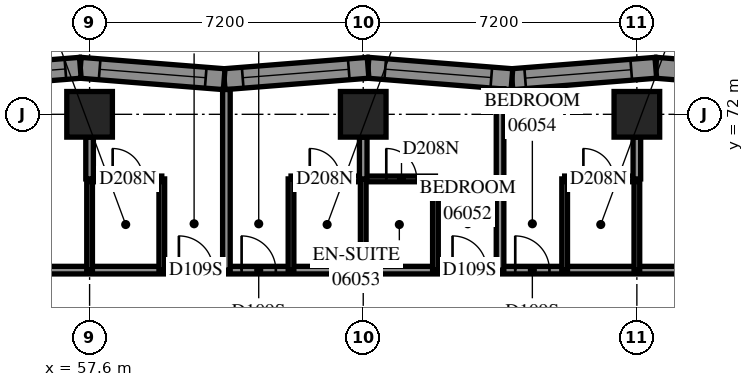
"""IFC4 building model, lengths in metres.
Left out: names, types, materials, properties, quantities, classifications, styles, units other than length and angle.
Written with IfcOpenShell. Run it as: python <this file> out.ifc"""

import sys

from ifc_helpers import new_model, si_unit, direction, frame, frame_2d, origin, origin_2d, place, context, subcontext, project, spatial, polyline, rectangle, outline, extrude, element, fill, save


model = new_model("IFC4")
c1 = context("Model", 3, precision=1e-05, world=origin(), true_north=direction((0.0, 1.0)))
c2 = subcontext(c1, "Body", "Model", "MODEL_VIEW")
j1 = project(units=[si_unit("LENGTHUNIT", "METRE"), si_unit("PLANEANGLEUNIT", "RADIAN")], contexts=[c1])
p1 = place(None, origin())
s1 = spatial("IfcSite", under=j1, at=p1, CompositionType="ELEMENT")
p2 = place(p1, origin())
s2 = spatial("IfcBuilding", under=s1, at=p2, CompositionType="ELEMENT")
p3 = place(p2, frame((0.0, 0.0, 27.0)))
s3 = spatial("IfcBuildingStorey", under=s2, at=p3, CompositionType="ELEMENT", Elevation=27.0)
for number, where, z_axis, x_axis in (
    (1, (57.6, 72.0, 0.0), (0.0, 0.0, 1.0), (1.0, 0.0, 0.0)),
    (2, (64.8, 72.0, 0.0), (0.0, 0.0, 1.0), (1.0, 0.0, 0.0)),
    (3, (72.0, 72.0, 0.0), (0.0, 0.0, 1.0), (1.0, 0.0, 0.0)),
):
    element("IfcColumn", number, at=place(p3, frame(where, z_axis=z_axis, x_axis=x_axis)), inside=s3, PredefinedType="COLUMN", context=c2, shape_type="SweptSolid", body=[
        extrude(rectangle(XDim=1.2, YDim=1.2, at=origin_2d()), origin(), (0.0, 0.0, 1.0), 3.1),
    ])
p4 = place(p3, frame((76.306, 72.922, 0.0), z_axis=(0.0, 0.0, 1.0), x_axis=(-0.9968745318, 0.0790010628, 0.0)))
e4 = element("IfcWall", 4, at=p4, inside=s3, PredefinedType="SOLIDWALL", context=c2, shape_type="SweptSolid", body=[
    extrude(outline(polyline([(0.043, -0.275), (3.841, -0.275), (3.797, 0.275), (-0.043, 0.275), (0.043, -0.275)])), origin(), (0.0, 0.0, 1.0), 3.1),
])
p5 = place(p4, frame((1.553, 0.0, 0.5)))
e5 = element("IfcOpeningElement", 5, at=p5, cuts=e4, PredefinedType="OPENING", context=c2, shape_type="SweptSolid", body=[
    extrude(rectangle(XDim=1.2, YDim=2.45, at=frame_2d((0.6, 1.225))), frame((0.0, 0.285, 0.0), z_axis=(0.0, -1.0, 0.0), x_axis=(1.0, 0.0, 0.0)), (0.0, 0.0, 1.0), 0.57),
])
p6 = place(p3, frame((72.499, 73.224, 0.0), z_axis=(0.0, 0.0, 1.0), x_axis=(-0.9968747806, -0.0789979222, 0.0)))
e6 = element("IfcWall", 6, at=p6, inside=s3, PredefinedType="SOLIDWALL", context=c2, shape_type="SweptSolid", body=[
    extrude(outline(polyline([(-0.022, -0.275), (3.776, -0.275), (3.819, 0.275), (0.022, 0.275), (-0.022, -0.275)])), origin(), (0.0, 0.0, 1.0), 3.1),
])
p7 = place(p6, frame((0.649, 0.0, 0.5)))
e7 = element("IfcOpeningElement", 7, at=p7, cuts=e6, PredefinedType="OPENING", context=c2, shape_type="SweptSolid", body=[
    extrude(rectangle(XDim=2.8, YDim=2.45, at=frame_2d((1.4, 1.225))), frame((0.0, 0.285, 0.0), z_axis=(0.0, -1.0, 0.0), x_axis=(1.0, 0.0, 0.0)), (0.0, 0.0, 1.0), 0.57),
])
p8 = place(p3, frame((68.713, 72.924, 0.0), z_axis=(0.0, 0.0, 1.0), x_axis=(-0.9968746163, 0.078999996, 0.0)))
e8 = element("IfcWall", 8, at=p8, inside=s3, PredefinedType="SOLIDWALL", context=c2, shape_type="SweptSolid", body=[
    extrude(outline(polyline([(0.022, -0.275), (3.819, -0.275), (3.776, 0.275), (-0.022, 0.275), (0.022, -0.275)])), origin(), (0.0, 0.0, 1.0), 3.1),
])
p9 = place(p8, frame((0.545, 0.0, 0.5)))
e9 = element("IfcOpeningElement", 9, at=p9, cuts=e8, PredefinedType="OPENING", context=c2, shape_type="SweptSolid", body=[
    extrude(rectangle(XDim=2.8, YDim=2.45, at=frame_2d((1.4, 1.225))), frame((0.0, 0.285, 0.0), z_axis=(0.0, -1.0, 0.0), x_axis=(1.0, 0.0, 0.0)), (0.0, 0.0, 1.0), 0.57),
])
p10 = place(p3, frame((64.927, 73.224, 0.0), z_axis=(0.0, 0.0, 1.0), x_axis=(-0.9968746163, -0.078999996, 0.0)))
e10 = element("IfcWall", 10, at=p10, inside=s3, PredefinedType="SOLIDWALL", context=c2, shape_type="SweptSolid", body=[
    extrude(outline(polyline([(-0.022, -0.275), (3.776, -0.275), (3.819, 0.275), (0.022, 0.275), (-0.022, -0.275)])), origin(), (0.0, 0.0, 1.0), 3.1),
])
p11 = place(p10, frame((0.51, 0.0, 0.5)))
e11 = element("IfcOpeningElement", 11, at=p11, cuts=e10, PredefinedType="OPENING", context=c2, shape_type="SweptSolid", body=[
    extrude(rectangle(XDim=2.8, YDim=2.45, at=frame_2d((1.4, 1.225))), frame((0.0, 0.285, 0.0), z_axis=(0.0, -1.0, 0.0), x_axis=(1.0, 0.0, 0.0)), (0.0, 0.0, 1.0), 0.57),
])
p12 = place(p3, frame((61.142, 72.924, 0.0), z_axis=(0.0, 0.0, 1.0), x_axis=(-0.9968746163, 0.078999996, 0.0)))
e12 = element("IfcWall", 12, at=p12, inside=s3, PredefinedType="SOLIDWALL", context=c2, shape_type="SweptSolid", body=[
    extrude(outline(polyline([(0.022, -0.275), (3.819, -0.275), (3.776, 0.275), (-0.022, 0.275), (0.022, -0.275)])), origin(), (0.0, 0.0, 1.0), 3.1),
])
p13 = place(p12, frame((0.488, 0.0, 0.5)))
e13 = element("IfcOpeningElement", 13, at=p13, cuts=e12, PredefinedType="OPENING", context=c2, shape_type="SweptSolid", body=[
    extrude(rectangle(XDim=2.8, YDim=2.45, at=frame_2d((1.4, 1.225))), frame((0.0, 0.285, 0.0), z_axis=(0.0, -1.0, 0.0), x_axis=(1.0, 0.0, 0.0)), (0.0, 0.0, 1.0), 0.57),
])
p14 = place(p3, frame((57.356, 73.224, 0.0), z_axis=(0.0, 0.0, 1.0), x_axis=(-0.9968746163, -0.078999996, 0.0)))
e14 = element("IfcWall", 14, at=p14, inside=s3, PredefinedType="SOLIDWALL", context=c2, shape_type="SweptSolid", body=[
    extrude(outline(polyline([(-0.022, -0.275), (3.776, -0.275), (3.819, 0.275), (0.022, 0.275), (-0.022, -0.275)])), origin(), (0.0, 0.0, 1.0), 3.1),
])
p15 = place(p14, frame((0.394, 0.0, 0.5)))
e15 = element("IfcOpeningElement", 15, at=p15, cuts=e14, PredefinedType="OPENING", context=c2, shape_type="SweptSolid", body=[
    extrude(rectangle(XDim=2.8, YDim=2.45, at=frame_2d((1.4, 1.225))), frame((0.0, 0.285, 0.0), z_axis=(0.0, -1.0, 0.0), x_axis=(1.0, 0.0, 0.0)), (0.0, 0.0, 1.0), 0.57),
])
p16 = place(p3, frame((54.5, 67.9, 0.0), z_axis=(0.0, 0.0, 1.0), x_axis=(1.0, 0.0, 0.0)))
e16 = element("IfcWall", 16, at=p16, inside=s3, PredefinedType="PARTITIONING", context=c2, shape_type="SweptSolid", body=[
    extrude(rectangle(XDim=20.6, YDim=0.2, at=frame_2d((10.3, 0.0))), origin(), (0.0, 0.0, 1.0), 3.1),
])
p17 = place(p16, frame((0.255, 0.0, 0.0)))
e17 = element("IfcOpeningElement", 17, at=p17, cuts=e16, PredefinedType="OPENING", context=c2, shape_type="SweptSolid", body=[
    extrude(rectangle(XDim=1.0, YDim=2.1, at=frame_2d((0.5, 1.05))), frame((0.0, 0.11, 0.0), z_axis=(0.0, -1.0, 0.0), x_axis=(1.0, 0.0, 0.0)), (0.0, 0.0, 1.0), 0.22),
])
p18 = place(p16, frame((19.345, 0.0, 0.0)))
e18 = element("IfcOpeningElement", 18, at=p18, cuts=e16, PredefinedType="OPENING", context=c2, shape_type="SweptSolid", body=[
    extrude(rectangle(XDim=1.0, YDim=2.1, at=frame_2d((0.5, 1.05))), frame((0.0, 0.11, 0.0), z_axis=(0.0, -1.0, 0.0), x_axis=(1.0, 0.0, 0.0)), (0.0, 0.0, 1.0), 0.22),
])
p19 = place(p16, frame((5.45, 0.0, 0.0)))
e19 = element("IfcOpeningElement", 19, at=p19, cuts=e16, PredefinedType="OPENING", context=c2, shape_type="SweptSolid", body=[
    extrude(rectangle(XDim=0.9, YDim=2.1, at=frame_2d((0.45, 1.05))), frame((0.0, 0.11, 0.0), z_axis=(0.0, -1.0, 0.0), x_axis=(1.0, 0.0, 0.0)), (0.0, 0.0, 1.0), 0.22),
])
p20 = place(p16, frame((7.1, 0.0, 0.0)))
e20 = element("IfcOpeningElement", 20, at=p20, cuts=e16, PredefinedType="OPENING", context=c2, shape_type="SweptSolid", body=[
    extrude(rectangle(XDim=0.9, YDim=2.1, at=frame_2d((0.45, 1.05))), frame((0.0, 0.11, 0.0), z_axis=(0.0, -1.0, 0.0), x_axis=(1.0, 0.0, 0.0)), (0.0, 0.0, 1.0), 0.22),
])
p21 = place(p16, frame((12.65, 0.0, 0.0)))
e21 = element("IfcOpeningElement", 21, at=p21, cuts=e16, PredefinedType="OPENING", context=c2, shape_type="SweptSolid", body=[
    extrude(rectangle(XDim=0.9, YDim=2.1, at=frame_2d((0.45, 1.05))), frame((0.0, 0.11, 0.0), z_axis=(0.0, -1.0, 0.0), x_axis=(1.0, 0.0, 0.0)), (0.0, 0.0, 1.0), 0.22),
])
p22 = place(p16, frame((14.3, 0.0, 0.0)))
e22 = element("IfcOpeningElement", 22, at=p22, cuts=e16, PredefinedType="OPENING", context=c2, shape_type="SweptSolid", body=[
    extrude(rectangle(XDim=0.9, YDim=2.1, at=frame_2d((0.45, 1.05))), frame((0.0, 0.11, 0.0), z_axis=(0.0, -1.0, 0.0), x_axis=(1.0, 0.0, 0.0)), (0.0, 0.0, 1.0), 0.22),
])
p23 = place(p3, frame((68.4, 67.9, 0.0), z_axis=(0.0, 0.0, 1.0), x_axis=(0.0, 1.0, 0.0)))
e23 = element("IfcWall", 23, at=p23, inside=s3, PredefinedType="PARTITIONING", context=c2, shape_type="SweptSolid", body=[
    extrude(rectangle(XDim=4.773, YDim=0.2, at=frame_2d((2.387, 0.0))), origin(), (0.0, 0.0, 1.0), 3.1),
])
p24 = place(p3, frame((61.2, 67.9, 0.0), z_axis=(0.0, 0.0, 1.0), x_axis=(0.0, 1.0, 0.0)))
e24 = element("IfcWall", 24, at=p24, inside=s3, PredefinedType="PARTITIONING", context=c2, shape_type="SweptSolid", body=[
    extrude(rectangle(XDim=4.753, YDim=0.2, at=frame_2d((2.377, 0.0))), origin(), (0.0, 0.0, 1.0), 3.1),
])
p25 = place(p3, frame((62.9, 70.3, 0.0), z_axis=(0.0, 0.0, 1.0), x_axis=(1.0, 0.0, 0.0)))
e25 = element("IfcWall", 25, at=p25, inside=s3, PredefinedType="PARTITIONING", context=c2, shape_type="SweptSolid", body=[
    extrude(rectangle(XDim=3.8, YDim=0.15, at=frame_2d((1.9, 0.0))), origin(), (0.0, 0.0, 1.0), 3.1),
])
p26 = place(p25, frame((0.493, 0.0, 0.0)))
e26 = element("IfcOpeningElement", 26, at=p26, cuts=e25, PredefinedType="OPENING", context=c2, shape_type="SweptSolid", body=[
    extrude(rectangle(XDim=0.8, YDim=2.1, at=frame_2d((0.4, 1.05))), frame((0.0, 0.085, 0.0), z_axis=(0.0, -1.0, 0.0), x_axis=(1.0, 0.0, 0.0)), (0.0, 0.0, 1.0), 0.17),
])
p27 = place(p25, frame((2.507, 0.0, 0.0)))
e27 = element("IfcOpeningElement", 27, at=p27, cuts=e25, PredefinedType="OPENING", context=c2, shape_type="SweptSolid", body=[
    extrude(rectangle(XDim=0.8, YDim=2.1, at=frame_2d((0.4, 1.05))), frame((0.0, 0.085, 0.0), z_axis=(0.0, -1.0, 0.0), x_axis=(1.0, 0.0, 0.0)), (0.0, 0.0, 1.0), 0.17),
])
for number, where, z_axis, x_axis in (
    (28, (59.5, 67.9, 0.0), (0.0, 0.0, 1.0), (0.0, 1.0, 0.0)),
    (29, (57.6, 67.9, 0.0), (0.0, 0.0, 1.0), (0.0, 1.0, 0.0)),
    (30, (62.9, 67.9, 0.0), (0.0, 0.0, 1.0), (0.0, 1.0, 0.0)),
    (31, (66.7, 67.9, 0.0), (0.0, 0.0, 1.0), (0.0, 1.0, 0.0)),
    (32, (64.8, 67.9, 0.0), (0.0, 0.0, 1.0), (0.0, 1.0, 0.0)),
    (33, (70.1, 67.9, 0.0), (0.0, 0.0, 1.0), (0.0, 1.0, 0.0)),
    (34, (72.0, 67.9, 0.0), (0.0, 0.0, 1.0), (0.0, 1.0, 0.0)),
):
    element("IfcWall", number, at=place(p3, frame(where, z_axis=z_axis, x_axis=x_axis)), inside=s3, PredefinedType="PARTITIONING", context=c2, shape_type="SweptSolid", body=[
        extrude(rectangle(XDim=2.4, YDim=0.15, at=frame_2d((1.2, 0.0))), origin(), (0.0, 0.0, 1.0), 3.1),
    ])
p28 = place(p3, frame((70.1, 70.3, 0.0), z_axis=(0.0, 0.0, 1.0), x_axis=(1.0, 0.0, 0.0)))
e35 = element("IfcWall", 35, at=p28, inside=s3, PredefinedType="PARTITIONING", context=c2, shape_type="SweptSolid", body=[
    extrude(rectangle(XDim=1.9, YDim=0.15, at=frame_2d((0.95, 0.0))), origin(), (0.0, 0.0, 1.0), 3.1),
])
p29 = place(p28, frame((0.493, 0.0, 0.0)))
e36 = element("IfcOpeningElement", 36, at=p29, cuts=e35, PredefinedType="OPENING", context=c2, shape_type="SweptSolid", body=[
    extrude(rectangle(XDim=0.8, YDim=2.1, at=frame_2d((0.4, 1.05))), frame((0.0, 0.085, 0.0), z_axis=(0.0, -1.0, 0.0), x_axis=(1.0, 0.0, 0.0)), (0.0, 0.0, 1.0), 0.17),
])
p30 = place(p3, frame((57.6, 70.3, 0.0), z_axis=(0.0, 0.0, 1.0), x_axis=(1.0, 0.0, 0.0)))
e37 = element("IfcWall", 37, at=p30, inside=s3, PredefinedType="PARTITIONING", context=c2, shape_type="SweptSolid", body=[
    extrude(rectangle(XDim=1.9, YDim=0.15, at=frame_2d((0.95, 0.0))), origin(), (0.0, 0.0, 1.0), 3.1),
])
p31 = place(p30, frame((0.607, 0.0, 0.0)))
e38 = element("IfcOpeningElement", 38, at=p31, cuts=e37, PredefinedType="OPENING", context=c2, shape_type="SweptSolid", body=[
    extrude(rectangle(XDim=0.8, YDim=2.1, at=frame_2d((0.4, 1.05))), frame((0.0, 0.085, 0.0), z_axis=(0.0, -1.0, 0.0), x_axis=(1.0, 0.0, 0.0)), (0.0, 0.0, 1.0), 0.17),
])
for number, where, z_axis, x_axis in (
    (39, (57.6, 70.3, 0.0), (0.0, 0.0, 1.0), (0.0, 1.0, 0.0)),
    (40, (64.8, 70.3, 0.0), (0.0, 0.0, 1.0), (0.0, 1.0, 0.0)),
    (41, (72.0, 70.3, 0.0), (0.0, 0.0, 1.0), (0.0, 1.0, 0.0)),
):
    element("IfcWall", number, at=place(p3, frame(where, z_axis=z_axis, x_axis=x_axis)), inside=s3, PredefinedType="PARTITIONING", context=c2, shape_type="SweptSolid", body=[
        extrude(rectangle(XDim=1.1, YDim=0.2, at=frame_2d((0.55, 0.0))), origin(), (0.0, 0.0, 1.0), 3.1),
    ])
p32 = place(p7, origin())
e42 = element("IfcWindow", 42, at=p32, inside=s3, PartitioningType="SINGLE_PANEL", PredefinedType="WINDOW", context=c2, shape_type="SweptSolid", body=[
    extrude(rectangle(XDim=2.8, YDim=2.45, at=frame_2d((1.4, 1.225))), frame((0.0, 0.155, 0.0), z_axis=(0.0, -1.0, 0.0), x_axis=(1.0, 0.0, 0.0)), (0.0, 0.0, 1.0), 0.06),
])
fill(e7, e42)
p33 = place(p9, origin())
e43 = element("IfcWindow", 43, at=p33, inside=s3, PartitioningType="SINGLE_PANEL", PredefinedType="WINDOW", context=c2, shape_type="SweptSolid", body=[
    extrude(rectangle(XDim=2.8, YDim=2.45, at=frame_2d((1.4, 1.225))), frame((0.0, 0.155, 0.0), z_axis=(0.0, -1.0, 0.0), x_axis=(1.0, 0.0, 0.0)), (0.0, 0.0, 1.0), 0.06),
])
fill(e9, e43)
p34 = place(p11, origin())
e44 = element("IfcWindow", 44, at=p34, inside=s3, PartitioningType="SINGLE_PANEL", PredefinedType="WINDOW", context=c2, shape_type="SweptSolid", body=[
    extrude(rectangle(XDim=2.8, YDim=2.45, at=frame_2d((1.4, 1.225))), frame((0.0, 0.155, 0.0), z_axis=(0.0, -1.0, 0.0), x_axis=(1.0, 0.0, 0.0)), (0.0, 0.0, 1.0), 0.06),
])
fill(e11, e44)
p35 = place(p13, origin())
e45 = element("IfcWindow", 45, at=p35, inside=s3, PartitioningType="SINGLE_PANEL", PredefinedType="WINDOW", context=c2, shape_type="SweptSolid", body=[
    extrude(rectangle(XDim=2.8, YDim=2.45, at=frame_2d((1.4, 1.225))), frame((0.0, 0.155, 0.0), z_axis=(0.0, -1.0, 0.0), x_axis=(1.0, 0.0, 0.0)), (0.0, 0.0, 1.0), 0.06),
])
fill(e13, e45)
p36 = place(p15, origin())
e46 = element("IfcWindow", 46, at=p36, inside=s3, PartitioningType="SINGLE_PANEL", PredefinedType="WINDOW", context=c2, shape_type="SweptSolid", body=[
    extrude(rectangle(XDim=2.8, YDim=2.45, at=frame_2d((1.4, 1.225))), frame((0.0, 0.155, 0.0), z_axis=(0.0, -1.0, 0.0), x_axis=(1.0, 0.0, 0.0)), (0.0, 0.0, 1.0), 0.06),
])
fill(e15, e46)
p37 = place(p19, origin())
e47 = element("IfcDoor", 47, at=p37, inside=s3, OperationType="SINGLE_SWING_RIGHT", PredefinedType="DOOR", context=c2, shape_type="SweptSolid", body=[
    extrude(rectangle(XDim=0.9, YDim=2.1, at=frame_2d((0.45, 1.05))), frame((0.0, 0.025, 0.0), z_axis=(0.0, -1.0, 0.0), x_axis=(1.0, 0.0, 0.0)), (0.0, 0.0, 1.0), 0.05),
])
fill(e19, e47)
p38 = place(p31, origin())
e48 = element("IfcDoor", 48, at=p38, inside=s3, OperationType="SINGLE_SWING_RIGHT", PredefinedType="DOOR", context=c2, shape_type="SweptSolid", body=[
    extrude(rectangle(XDim=0.8, YDim=2.1, at=frame_2d((0.4, 1.05))), frame((0.0, 0.025, 0.0), z_axis=(0.0, -1.0, 0.0), x_axis=(1.0, 0.0, 0.0)), (0.0, 0.0, 1.0), 0.05),
])
fill(e38, e48)
p39 = place(p20, origin())
e49 = element("IfcDoor", 49, at=p39, inside=s3, OperationType="SINGLE_SWING_LEFT", PredefinedType="DOOR", context=c2, shape_type="SweptSolid", body=[
    extrude(rectangle(XDim=0.9, YDim=2.1, at=frame_2d((0.45, 1.05))), frame((0.0, 0.025, 0.0), z_axis=(0.0, -1.0, 0.0), x_axis=(1.0, 0.0, 0.0)), (0.0, 0.0, 1.0), 0.05),
])
fill(e20, e49)
p40 = place(p26, origin())
e50 = element("IfcDoor", 50, at=p40, inside=s3, OperationType="SINGLE_SWING_RIGHT", PredefinedType="DOOR", context=c2, shape_type="SweptSolid", body=[
    extrude(rectangle(XDim=0.8, YDim=2.1, at=frame_2d((0.4, 1.05))), frame((0.0, 0.025, 0.0), z_axis=(0.0, -1.0, 0.0), x_axis=(1.0, 0.0, 0.0)), (0.0, 0.0, 1.0), 0.05),
])
fill(e26, e50)
p41 = place(p21, origin())
e51 = element("IfcDoor", 51, at=p41, inside=s3, OperationType="SINGLE_SWING_RIGHT", PredefinedType="DOOR", context=c2, shape_type="SweptSolid", body=[
    extrude(rectangle(XDim=0.9, YDim=2.1, at=frame_2d((0.45, 1.05))), frame((0.0, 0.025, 0.0), z_axis=(0.0, -1.0, 0.0), x_axis=(1.0, 0.0, 0.0)), (0.0, 0.0, 1.0), 0.05),
])
fill(e21, e51)
p42 = place(p27, origin())
e52 = element("IfcDoor", 52, at=p42, inside=s3, OperationType="SINGLE_SWING_RIGHT", PredefinedType="DOOR", context=c2, shape_type="SweptSolid", body=[
    extrude(rectangle(XDim=0.8, YDim=2.1, at=frame_2d((0.4, 1.05))), frame((0.0, 0.025, 0.0), z_axis=(0.0, -1.0, 0.0), x_axis=(1.0, 0.0, 0.0)), (0.0, 0.0, 1.0), 0.05),
])
fill(e27, e52)
p43 = place(p22, origin())
e53 = element("IfcDoor", 53, at=p43, inside=s3, OperationType="SINGLE_SWING_LEFT", PredefinedType="DOOR", context=c2, shape_type="SweptSolid", body=[
    extrude(rectangle(XDim=0.9, YDim=2.1, at=frame_2d((0.45, 1.05))), frame((0.0, 0.025, 0.0), z_axis=(0.0, -1.0, 0.0), x_axis=(1.0, 0.0, 0.0)), (0.0, 0.0, 1.0), 0.05),
])
fill(e22, e53)
p44 = place(p29, origin())
e54 = element("IfcDoor", 54, at=p44, inside=s3, OperationType="SINGLE_SWING_RIGHT", PredefinedType="DOOR", context=c2, shape_type="SweptSolid", body=[
    extrude(rectangle(XDim=0.8, YDim=2.1, at=frame_2d((0.4, 1.05))), frame((0.0, 0.025, 0.0), z_axis=(0.0, -1.0, 0.0), x_axis=(1.0, 0.0, 0.0)), (0.0, 0.0, 1.0), 0.05),
])
fill(e36, e54)
save(model, sys.argv[1])
